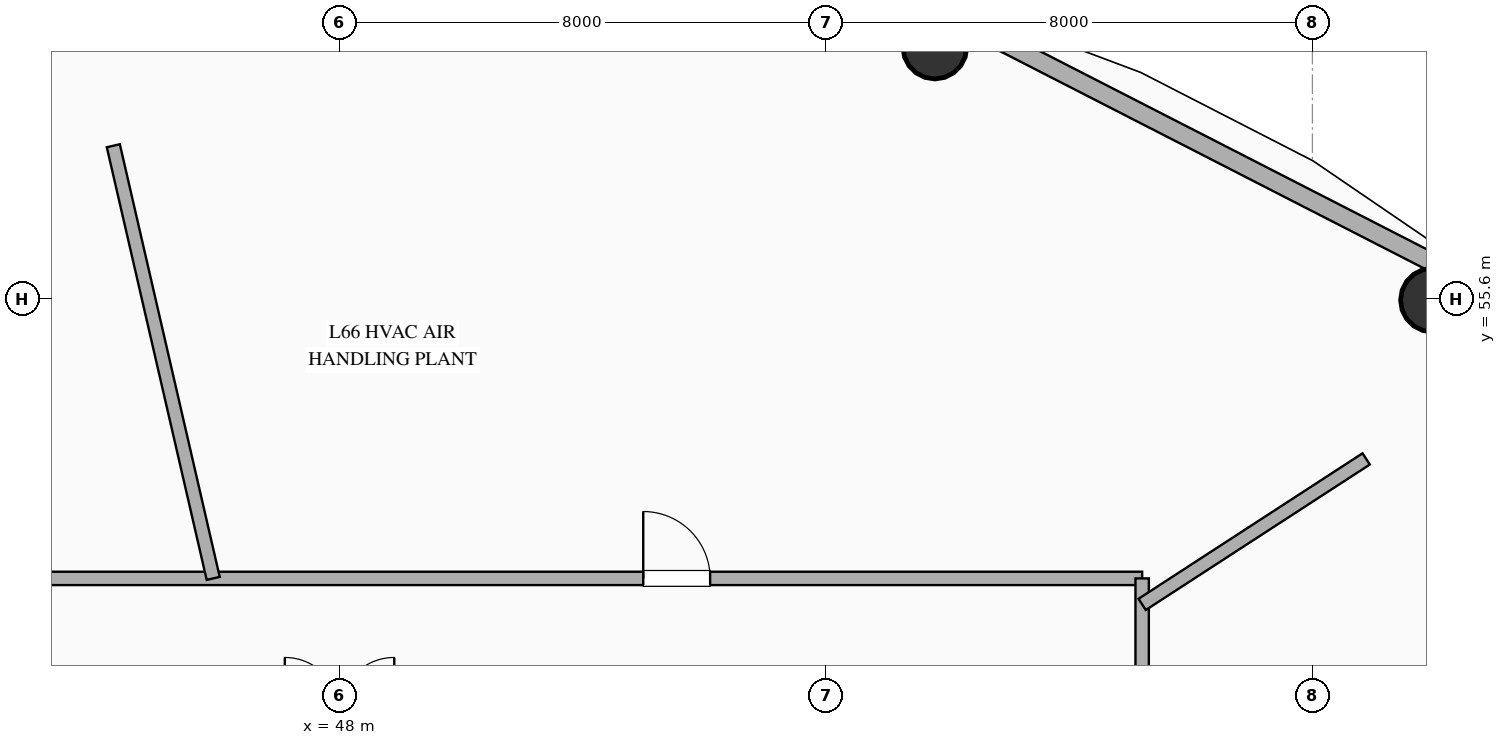
"""IFC4 building model, lengths in metres.
Left out: names, types, materials, properties, quantities, classifications, styles, units other than length and angle.
Written with IfcOpenShell. Run it as: python <this file> out.ifc"""

import sys

from ifc_helpers import new_model, si_unit, direction, frame, frame_2d, origin, origin_2d, place, context, subcontext, project, spatial, rectangle, hollow_circle, extrude, element, fill, save


model = new_model("IFC4")
c1 = context("Model", 3, precision=1e-05, world=origin(), true_north=direction((0.0, 1.0)))
c2 = subcontext(c1, "Body", "Model", "MODEL_VIEW")
j1 = project(units=[si_unit("LENGTHUNIT", "METRE"), si_unit("PLANEANGLEUNIT", "RADIAN")], contexts=[c1])
p1 = place(None, origin())
s1 = spatial("IfcSite", under=j1, at=p1, CompositionType="ELEMENT")
p2 = place(p1, origin())
s2 = spatial("IfcBuilding", under=s1, at=p2, CompositionType="ELEMENT")
p3 = place(p2, frame((0.0, 0.0, 256.8)))
s3 = spatial("IfcBuildingStorey", under=s2, at=p3, CompositionType="ELEMENT", Elevation=256.8)
for number, where, z_axis, x_axis in (
    (1, (65.975, 55.576, 0.0), (0.0, 0.0, 1.0), (1.0, 0.0, 0.0)),
    (2, (57.791, 59.739, 0.0), (0.0, 0.0, 1.0), (1.0, 0.0, 0.0)),
):
    element("IfcColumn", number, at=place(p3, frame(where, z_axis=z_axis, x_axis=x_axis)), inside=s3, PredefinedType="COLUMN", context=c2, shape_type="SweptSolid", body=[
        extrude(hollow_circle(Radius=0.525, WallThickness=0.028, at=origin_2d()), origin(), (0.0, 0.0, 1.0), 5.17),
    ])
p4 = place(p3, frame((66.383, 55.987, 0.0), z_axis=(0.0, 0.0, 1.0), x_axis=(-0.890007394051, 0.455946091699, 0.0)))
e3 = element("IfcWall", 3, at=p4, inside=s3, PredefinedType="SOLIDWALL", context=c2, shape_type="SweptSolid", body=[
    extrude(rectangle(XDim=9.404, YDim=0.3, at=frame_2d((4.702, 0.0))), origin(), (0.0, 0.0, 1.0), 5.17),
])
p5 = place(p3, frame((34.8, 51.0, 0.0), z_axis=(0.0, 0.0, 1.0), x_axis=(1.0, 0.0, 0.0)))
e4 = element("IfcWall", 4, at=p5, inside=s3, PredefinedType="SOLIDWALL", context=c2, shape_type="SweptSolid", body=[
    extrude(rectangle(XDim=26.4, YDim=0.22, at=frame_2d((13.2, 0.0))), origin(), (0.0, 0.0, 1.0), 3.47),
])
p6 = place(p5, frame((18.195, 0.0, 0.0)))
e5 = element("IfcOpeningElement", 5, at=p6, cuts=e4, PredefinedType="OPENING", context=c2, shape_type="SweptSolid", body=[
    extrude(rectangle(XDim=1.1, YDim=2.15, at=frame_2d((0.55, 1.075))), frame((0.0, 0.12, 0.0), z_axis=(0.0, -1.0, 0.0), x_axis=(1.0, 0.0, 0.0)), (0.0, 0.0, 1.0), 0.24),
])
p7 = place(p5, frame((5.011, 0.0, 0.0)))
e6 = element("IfcOpeningElement", 6, at=p7, cuts=e4, PredefinedType="OPENING", context=c2, shape_type="SweptSolid", body=[
    extrude(rectangle(XDim=1.1, YDim=2.15, at=frame_2d((0.55, 1.075))), frame((0.0, 0.12, 0.0), z_axis=(0.0, -1.0, 0.0), x_axis=(1.0, 0.0, 0.0)), (0.0, 0.0, 1.0), 0.24),
])
p8 = place(p3, frame((61.2, 51.0, 0.0), z_axis=(0.0, 0.0, 1.0), x_axis=(0.0, -1.0, 0.0)))
e7 = element("IfcWall", 7, at=p8, inside=s3, PredefinedType="SOLIDWALL", context=c2, shape_type="SweptSolid", body=[
    extrude(rectangle(XDim=18.0, YDim=0.22, at=frame_2d((9.0, 0.0))), origin(), (0.0, 0.0, 1.0), 3.47),
])
p9 = place(p8, frame((4.391, 0.0, 0.0)))
e8 = element("IfcOpeningElement", 8, at=p9, cuts=e7, PredefinedType="OPENING", context=c2, shape_type="SweptSolid", body=[
    extrude(rectangle(XDim=1.1, YDim=2.15, at=frame_2d((0.55, 1.075))), frame((0.0, 0.12, 0.0), z_axis=(0.0, -1.0, 0.0), x_axis=(1.0, 0.0, 0.0)), (0.0, 0.0, 1.0), 0.24),
])
p10 = place(p3, frame((44.28, 58.115, 0.0), z_axis=(0.0, 0.0, 1.0), x_axis=(0.224944969535, -0.974371469554, 0.0)))
e9 = element("IfcWall", 9, at=p10, inside=s3, PredefinedType="SOLIDWALL", context=c2, shape_type="SweptSolid", body=[
    extrude(rectangle(XDim=7.302, YDim=0.22, at=frame_2d((3.651, 0.0))), origin(), (0.0, 0.0, 1.0), 3.47),
])
p11 = place(p3, frame((64.885, 52.965, 0.0), z_axis=(0.0, 0.0, 1.0), x_axis=(-0.83866699899, -0.544644530685, 0.0)))
e10 = element("IfcWall", 10, at=p11, inside=s3, PredefinedType="SOLIDWALL", context=c2, shape_type="SweptSolid", body=[
    extrude(rectangle(XDim=4.393, YDim=0.22, at=frame_2d((2.197, 0.0))), origin(), (0.0, 0.0, 1.0), 3.47),
])
p12 = place(p6, origin())
e11 = element("IfcDoor", 11, at=p12, inside=s3, OperationType="SINGLE_SWING_LEFT", PredefinedType="DOOR", context=c2, shape_type="SweptSolid", body=[
    extrude(rectangle(XDim=1.1, YDim=2.15, at=frame_2d((0.55, 1.075))), frame((0.0, 0.025, 0.0), z_axis=(0.0, -1.0, 0.0), x_axis=(1.0, 0.0, 0.0)), (0.0, 0.0, 1.0), 0.05),
])
fill(e5, e11)
save(model, sys.argv[1])
